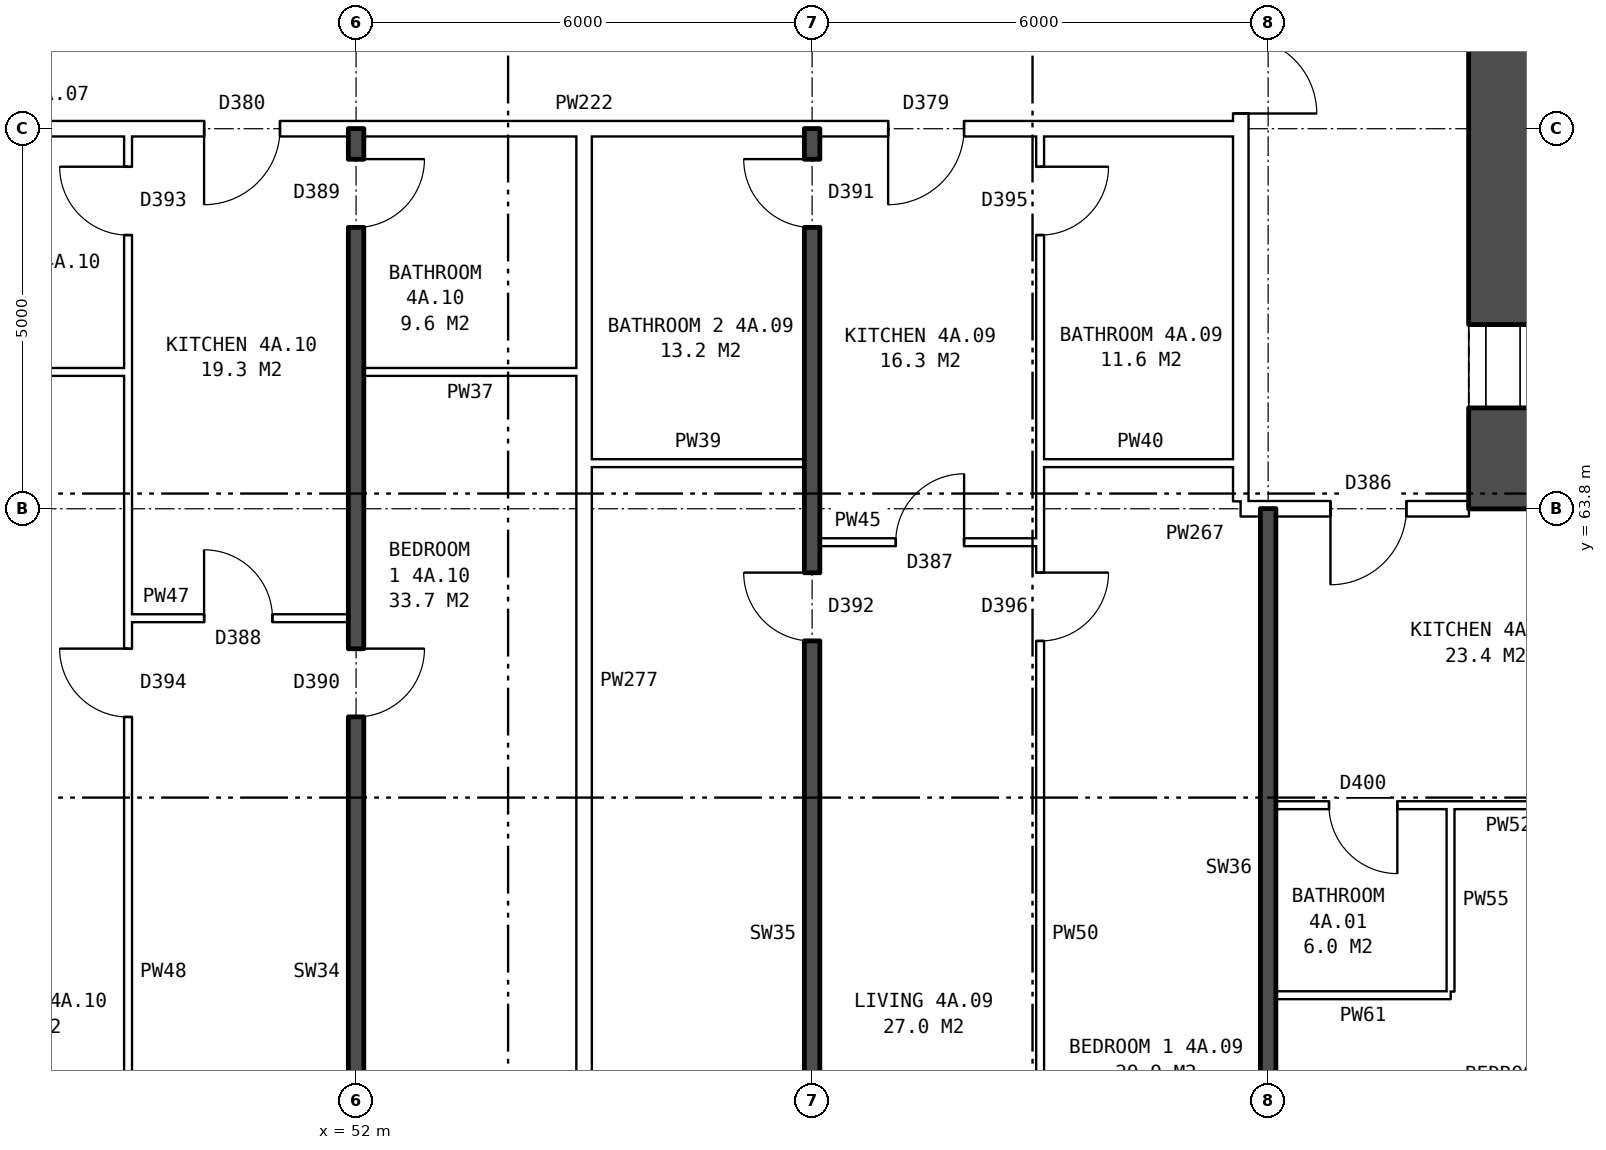
"""IFC4 building model, lengths in metres.
Left out: names, types, materials, properties, quantities, classifications, styles, units other than length and angle.
Written with IfcOpenShell. Run it as: python <this file> out.ifc"""

import sys

from ifc_helpers import new_model, si_unit, direction, frame, frame_2d, origin, place, context, subcontext, project, spatial, rectangle, extrude, element, fill, save


model = new_model("IFC4")
c1 = context("Model", 3, precision=1e-05, world=origin(), true_north=direction((0.0, 1.0)))
c2 = subcontext(c1, "Body", "Model", "MODEL_VIEW")
j1 = project(units=[si_unit("LENGTHUNIT", "METRE"), si_unit("PLANEANGLEUNIT", "RADIAN")], contexts=[c1])
p1 = place(None, origin())
s1 = spatial("IfcSite", under=j1, at=p1, CompositionType="ELEMENT")
p2 = place(p1, origin())
s2 = spatial("IfcBuilding", under=s1, at=p2, CompositionType="ELEMENT")
p3 = place(p2, frame((0.0, 0.0, 19.5)))
s3 = spatial("IfcBuildingStorey", under=s2, at=p3, CompositionType="ELEMENT", Elevation=19.5)
p4 = place(p3, frame((67.09, 64.7, 0.0), z_axis=(0.0, 0.0, 1.0), x_axis=(0.0, 1.0, 0.0)))
e1 = element("IfcWall", 1, at=p4, inside=s3, PredefinedType="SHEAR", context=c2, shape_type="SweptSolid", body=[
    extrude(rectangle(XDim=10.6, YDim=0.9, at=frame_2d((5.3, 0.0))), origin(), (0.0, 0.0, 1.0), 2.85),
])
p5 = place(p4, frame((0.425, 0.0, 0.0)))
e2 = element("IfcOpeningElement", 2, at=p5, cuts=e1, PredefinedType="OPENING", context=c2, shape_type="SweptSolid", body=[
    extrude(rectangle(XDim=1.1, YDim=2.1, at=frame_2d((0.55, 1.05))), frame((0.0, 0.46, 0.0), z_axis=(0.0, -1.0, 0.0), x_axis=(1.0, 0.0, 0.0)), (0.0, 0.0, 1.0), 0.92),
])
p6 = place(p4, frame((9.0, 0.0, 0.0)))
e3 = element("IfcOpeningElement", 3, at=p6, cuts=e1, PredefinedType="OPENING", context=c2, shape_type="SweptSolid", body=[
    extrude(rectangle(XDim=1.1, YDim=2.1, at=frame_2d((0.55, 1.05))), frame((0.0, 0.46, 0.0), z_axis=(0.0, -1.0, 0.0), x_axis=(1.0, 0.0, 0.0)), (0.0, 0.0, 1.0), 0.92),
])
p7 = place(p3, frame((66.64, 64.25, 0.0), z_axis=(0.0, 0.0, 1.0), x_axis=(1.0, 0.0, 0.0)))
e4 = element("IfcWall", 4, at=p7, inside=s3, PredefinedType="SHEAR", context=c2, shape_type="SweptSolid", body=[
    extrude(rectangle(XDim=9.0, YDim=0.9, at=frame_2d((4.5, 0.0))), origin(), (0.0, 0.0, 1.0), 2.85),
])
p8 = place(p3, frame((63.64, 63.9, 0.0), z_axis=(0.0, 0.0, 1.0), x_axis=(0.0, 1.0, 0.0)))
e5 = element("IfcWall", 5, at=p8, inside=s3, PredefinedType="PARTITIONING", context=c2, shape_type="SweptSolid", body=[
    extrude(rectangle(XDim=12.2, YDim=0.2, at=frame_2d((6.1, 0.0))), origin(), (0.0, 0.0, 1.0), 2.85),
])
p9 = place(p8, frame((5.1, 0.0, 0.0)))
e6 = element("IfcOpeningElement", 6, at=p9, cuts=e5, PredefinedType="OPENING", context=c2, shape_type="SweptSolid", body=[
    extrude(rectangle(XDim=2.0, YDim=2.1, at=frame_2d((1.0, 1.05))), frame((0.0, 0.11, 0.0), z_axis=(0.0, -1.0, 0.0), x_axis=(1.0, 0.0, 0.0)), (0.0, 0.0, 1.0), 0.22),
])
p10 = place(p3, frame((64.1, 57.4, 0.0), z_axis=(0.0, 0.0, 1.0), x_axis=(1.0, 0.0, 0.0)))
e7 = element("IfcWall", 7, at=p10, inside=s3, PredefinedType="PARTITIONING", context=c2, shape_type="SweptSolid", body=[
    extrude(rectangle(XDim=2.3, YDim=0.1, at=frame_2d((1.15, 0.0))), origin(), (0.0, 0.0, 1.0), 2.85),
])
p11 = place(p3, frame((64.1, 59.9, 0.0), z_axis=(0.0, 0.0, 1.0), x_axis=(1.0, 0.0, 0.0)))
e8 = element("IfcWall", 8, at=p11, inside=s3, PredefinedType="PARTITIONING", context=c2, shape_type="SweptSolid", body=[
    extrude(rectangle(XDim=5.8, YDim=0.1, at=frame_2d((2.9, 0.0))), origin(), (0.0, 0.0, 1.0), 2.85),
])
p12 = place(p11, frame((3.6, 0.0, 0.0)))
e9 = element("IfcOpeningElement", 9, at=p12, cuts=e8, PredefinedType="OPENING", context=c2, shape_type="SweptSolid", body=[
    extrude(rectangle(XDim=0.9, YDim=2.1, at=frame_2d((0.45, 1.05))), frame((0.0, 0.06, 0.0), z_axis=(0.0, -1.0, 0.0), x_axis=(1.0, 0.0, 0.0)), (0.0, 0.0, 1.0), 0.12),
])
p13 = place(p11, frame((0.7, 0.0, 0.0)))
e10 = element("IfcOpeningElement", 10, at=p13, cuts=e8, PredefinedType="OPENING", context=c2, shape_type="SweptSolid", body=[
    extrude(rectangle(XDim=0.9, YDim=2.1, at=frame_2d((0.45, 1.05))), frame((0.0, 0.06, 0.0), z_axis=(0.0, -1.0, 0.0), x_axis=(1.0, 0.0, 0.0)), (0.0, 0.0, 1.0), 0.12),
])
p14 = place(p3, frame((49.0, 62.36, 0.0), z_axis=(0.0, 0.0, 1.0), x_axis=(1.0, 0.0, 0.0)))
e11 = element("IfcWall", 11, at=p14, inside=s3, PredefinedType="PARTITIONING", context=c2, shape_type="SweptSolid", body=[
    extrude(rectangle(XDim=2.9, YDim=0.1, at=frame_2d((1.45, 0.0))), origin(), (0.0, 0.0, 1.0), 2.85),
])
p15 = place(p14, frame((1.0, 0.0, 0.0)))
e12 = element("IfcOpeningElement", 12, at=p15, cuts=e11, PredefinedType="OPENING", context=c2, shape_type="SweptSolid", body=[
    extrude(rectangle(XDim=0.9, YDim=2.1, at=frame_2d((0.45, 1.05))), frame((0.0, 0.06, 0.0), z_axis=(0.0, -1.0, 0.0), x_axis=(1.0, 0.0, 0.0)), (0.0, 0.0, 1.0), 0.12),
])
p16 = place(p3, frame((58.1, 63.36, 0.0), z_axis=(0.0, 0.0, 1.0), x_axis=(1.0, 0.0, 0.0)))
e13 = element("IfcWall", 13, at=p16, inside=s3, PredefinedType="PARTITIONING", context=c2, shape_type="SweptSolid", body=[
    extrude(rectangle(XDim=2.9, YDim=0.1, at=frame_2d((1.45, 0.0))), origin(), (0.0, 0.0, 1.0), 2.85),
])
p17 = place(p16, frame((1.0, 0.0, 0.0)))
e14 = element("IfcOpeningElement", 14, at=p17, cuts=e13, PredefinedType="OPENING", context=c2, shape_type="SweptSolid", body=[
    extrude(rectangle(XDim=0.9, YDim=2.1, at=frame_2d((0.45, 1.05))), frame((0.0, 0.06, 0.0), z_axis=(0.0, -1.0, 0.0), x_axis=(1.0, 0.0, 0.0)), (0.0, 0.0, 1.0), 0.12),
])
p18 = place(p3, frame((63.64, 63.8, 0.0), z_axis=(0.0, 0.0, 1.0), x_axis=(1.0, 0.0, 0.0)))
e15 = element("IfcWall", 15, at=p18, inside=s3, PredefinedType="PARTITIONING", context=c2, shape_type="SweptSolid", body=[
    extrude(rectangle(XDim=3.0, YDim=0.2, at=frame_2d((1.5, 0.0))), origin(), (0.0, 0.0, 1.0), 2.85),
])
p19 = place(p18, frame((1.18, 0.0, 0.0)))
e16 = element("IfcOpeningElement", 16, at=p19, cuts=e15, PredefinedType="OPENING", context=c2, shape_type="SweptSolid", body=[
    extrude(rectangle(XDim=1.0, YDim=2.1, at=frame_2d((0.5, 1.05))), frame((0.0, 0.11, 0.0), z_axis=(0.0, -1.0, 0.0), x_axis=(1.0, 0.0, 0.0)), (0.0, 0.0, 1.0), 0.22),
])
p20 = place(p3, frame((55.1, 64.4, 0.0), z_axis=(0.0, 0.0, 1.0), x_axis=(1.0, 0.0, 0.0)))
e17 = element("IfcWall", 17, at=p20, inside=s3, PredefinedType="PARTITIONING", context=c2, shape_type="SweptSolid", body=[
    extrude(rectangle(XDim=2.8, YDim=0.1, at=frame_2d((1.4, 0.0))), origin(), (0.0, 0.0, 1.0), 2.85),
])
p21 = place(p3, frame((61.0, 64.4, 0.0), z_axis=(0.0, 0.0, 1.0), x_axis=(1.0, 0.0, 0.0)))
e18 = element("IfcWall", 18, at=p21, inside=s3, PredefinedType="PARTITIONING", context=c2, shape_type="SweptSolid", body=[
    extrude(rectangle(XDim=2.64, YDim=0.1, at=frame_2d((1.32, 0.0))), origin(), (0.0, 0.0, 1.0), 2.85),
])
p22 = place(p3, frame((46.1, 65.6, 0.0), z_axis=(0.0, 0.0, 1.0), x_axis=(1.0, 0.0, 0.0)))
e19 = element("IfcWall", 19, at=p22, inside=s3, PredefinedType="PARTITIONING", context=c2, shape_type="SweptSolid", body=[
    extrude(rectangle(XDim=2.9, YDim=0.1, at=frame_2d((1.45, 0.0))), origin(), (0.0, 0.0, 1.0), 2.85),
])
p23 = place(p3, frame((52.1, 65.6, 0.0), z_axis=(0.0, 0.0, 1.0), x_axis=(1.0, 0.0, 0.0)))
e20 = element("IfcWall", 20, at=p23, inside=s3, PredefinedType="PARTITIONING", context=c2, shape_type="SweptSolid", body=[
    extrude(rectangle(XDim=2.8, YDim=0.1, at=frame_2d((1.4, 0.0))), origin(), (0.0, 0.0, 1.0), 2.85),
])
p24 = place(p3, frame((44.36, 68.8, 0.0), z_axis=(0.0, 0.0, 1.0), x_axis=(1.0, 0.0, 0.0)))
e21 = element("IfcWall", 21, at=p24, inside=s3, PredefinedType="PARTITIONING", context=c2, shape_type="SweptSolid", body=[
    extrude(rectangle(XDim=19.28, YDim=0.2, at=frame_2d((9.64, 0.0))), origin(), (0.0, 0.0, 1.0), 2.85),
])
p25 = place(p24, frame((14.64, 0.0, 0.0)))
e22 = element("IfcOpeningElement", 22, at=p25, cuts=e21, PredefinedType="OPENING", context=c2, shape_type="SweptSolid", body=[
    extrude(rectangle(XDim=1.0, YDim=2.1, at=frame_2d((0.5, 1.05))), frame((0.0, 0.11, 0.0), z_axis=(0.0, -1.0, 0.0), x_axis=(1.0, 0.0, 0.0)), (0.0, 0.0, 1.0), 0.22),
])
p26 = place(p24, frame((5.64, 0.0, 0.0)))
e23 = element("IfcOpeningElement", 23, at=p26, cuts=e21, PredefinedType="OPENING", context=c2, shape_type="SweptSolid", body=[
    extrude(rectangle(XDim=1.0, YDim=2.1, at=frame_2d((0.5, 1.05))), frame((0.0, 0.11, 0.0), z_axis=(0.0, -1.0, 0.0), x_axis=(1.0, 0.0, 0.0)), (0.0, 0.0, 1.0), 0.22),
])
p27 = place(p3, frame((49.0, 54.36, 0.0), z_axis=(0.0, 0.0, 1.0), x_axis=(0.0, 1.0, 0.0)))
e24 = element("IfcWall", 24, at=p27, inside=s3, PredefinedType="PARTITIONING", context=c2, shape_type="SweptSolid", body=[
    extrude(rectangle(XDim=14.34, YDim=0.1, at=frame_2d((7.17, 0.0))), origin(), (0.0, 0.0, 1.0), 2.85),
])
p28 = place(p27, frame((6.7, 0.0, 0.0)))
e25 = element("IfcOpeningElement", 25, at=p28, cuts=e24, PredefinedType="OPENING", context=c2, shape_type="SweptSolid", body=[
    extrude(rectangle(XDim=0.9, YDim=2.1, at=frame_2d((0.45, 1.05))), frame((0.0, 0.06, 0.0), z_axis=(0.0, -1.0, 0.0), x_axis=(1.0, 0.0, 0.0)), (0.0, 0.0, 1.0), 0.12),
])
p29 = place(p27, frame((13.04, 0.0, 0.0)))
e26 = element("IfcOpeningElement", 26, at=p29, cuts=e24, PredefinedType="OPENING", context=c2, shape_type="SweptSolid", body=[
    extrude(rectangle(XDim=0.9, YDim=2.1, at=frame_2d((0.45, 1.05))), frame((0.0, 0.06, 0.0), z_axis=(0.0, -1.0, 0.0), x_axis=(1.0, 0.0, 0.0)), (0.0, 0.0, 1.0), 0.12),
])
p30 = place(p3, frame((52.0, 54.36, 0.0), z_axis=(0.0, 0.0, 1.0), x_axis=(0.0, 1.0, 0.0)))
e27 = element("IfcWall", 27, at=p30, inside=s3, PredefinedType="SOLIDWALL", context=c2, shape_type="SweptSolid", body=[
    extrude(rectangle(XDim=14.44, YDim=0.2, at=frame_2d((7.22, 0.0))), origin(), (0.0, 0.0, 1.0), 2.85),
])
p31 = place(p30, frame((6.7, 0.0, 0.0)))
e28 = element("IfcOpeningElement", 28, at=p31, cuts=e27, PredefinedType="OPENING", context=c2, shape_type="SweptSolid", body=[
    extrude(rectangle(XDim=0.9, YDim=2.1, at=frame_2d((0.45, 1.05))), frame((0.0, 0.11, 0.0), z_axis=(0.0, -1.0, 0.0), x_axis=(1.0, 0.0, 0.0)), (0.0, 0.0, 1.0), 0.22),
])
p32 = place(p30, frame((13.14, 0.0, 0.0)))
e29 = element("IfcOpeningElement", 29, at=p32, cuts=e27, PredefinedType="OPENING", context=c2, shape_type="SweptSolid", body=[
    extrude(rectangle(XDim=0.9, YDim=2.1, at=frame_2d((0.45, 1.05))), frame((0.0, 0.11, 0.0), z_axis=(0.0, -1.0, 0.0), x_axis=(1.0, 0.0, 0.0)), (0.0, 0.0, 1.0), 0.22),
])
p33 = place(p3, frame((55.0, 54.36, 0.0), z_axis=(0.0, 0.0, 1.0), x_axis=(0.0, 1.0, 0.0)))
e30 = element("IfcWall", 30, at=p33, inside=s3, PredefinedType="PARTITIONING", context=c2, shape_type="SweptSolid", body=[
    extrude(rectangle(XDim=14.34, YDim=0.2, at=frame_2d((7.17, 0.0))), origin(), (0.0, 0.0, 1.0), 2.85),
])
p34 = place(p3, frame((58.0, 54.36, 0.0), z_axis=(0.0, 0.0, 1.0), x_axis=(0.0, 1.0, 0.0)))
e31 = element("IfcWall", 31, at=p34, inside=s3, PredefinedType="SOLIDWALL", context=c2, shape_type="SweptSolid", body=[
    extrude(rectangle(XDim=14.44, YDim=0.2, at=frame_2d((7.22, 0.0))), origin(), (0.0, 0.0, 1.0), 2.85),
])
p35 = place(p34, frame((7.7, 0.0, 0.0)))
e32 = element("IfcOpeningElement", 32, at=p35, cuts=e31, PredefinedType="OPENING", context=c2, shape_type="SweptSolid", body=[
    extrude(rectangle(XDim=0.9, YDim=2.1, at=frame_2d((0.45, 1.05))), frame((0.0, 0.11, 0.0), z_axis=(0.0, -1.0, 0.0), x_axis=(1.0, 0.0, 0.0)), (0.0, 0.0, 1.0), 0.22),
])
p36 = place(p34, frame((13.14, 0.0, 0.0)))
e33 = element("IfcOpeningElement", 33, at=p36, cuts=e31, PredefinedType="OPENING", context=c2, shape_type="SweptSolid", body=[
    extrude(rectangle(XDim=0.9, YDim=2.1, at=frame_2d((0.45, 1.05))), frame((0.0, 0.11, 0.0), z_axis=(0.0, -1.0, 0.0), x_axis=(1.0, 0.0, 0.0)), (0.0, 0.0, 1.0), 0.22),
])
p37 = place(p3, frame((61.0, 54.36, 0.0), z_axis=(0.0, 0.0, 1.0), x_axis=(0.0, 1.0, 0.0)))
e34 = element("IfcWall", 34, at=p37, inside=s3, PredefinedType="PARTITIONING", context=c2, shape_type="SweptSolid", body=[
    extrude(rectangle(XDim=14.34, YDim=0.1, at=frame_2d((7.17, 0.0))), origin(), (0.0, 0.0, 1.0), 2.85),
])
p38 = place(p37, frame((7.7, 0.0, 0.0)))
e35 = element("IfcOpeningElement", 35, at=p38, cuts=e34, PredefinedType="OPENING", context=c2, shape_type="SweptSolid", body=[
    extrude(rectangle(XDim=0.9, YDim=2.1, at=frame_2d((0.45, 1.05))), frame((0.0, 0.06, 0.0), z_axis=(0.0, -1.0, 0.0), x_axis=(1.0, 0.0, 0.0)), (0.0, 0.0, 1.0), 0.12),
])
p39 = place(p37, frame((13.04, 0.0, 0.0)))
e36 = element("IfcOpeningElement", 36, at=p39, cuts=e34, PredefinedType="OPENING", context=c2, shape_type="SweptSolid", body=[
    extrude(rectangle(XDim=0.9, YDim=2.1, at=frame_2d((0.45, 1.05))), frame((0.0, 0.06, 0.0), z_axis=(0.0, -1.0, 0.0), x_axis=(1.0, 0.0, 0.0)), (0.0, 0.0, 1.0), 0.12),
])
p40 = place(p3, frame((64.0, 54.36, 0.0), z_axis=(0.0, 0.0, 1.0), x_axis=(0.0, 1.0, 0.0)))
e37 = element("IfcWall", 37, at=p40, inside=s3, PredefinedType="SOLIDWALL", context=c2, shape_type="SweptSolid", body=[
    extrude(rectangle(XDim=9.44, YDim=0.2, at=frame_2d((4.72, 0.0))), origin(), (0.0, 0.0, 1.0), 2.85),
])
p41 = place(p3, frame((66.4, 57.45, 0.0), z_axis=(0.0, 0.0, 1.0), x_axis=(0.0, 1.0, 0.0)))
e38 = element("IfcWall", 38, at=p41, inside=s3, PredefinedType="PARTITIONING", context=c2, shape_type="SweptSolid", body=[
    extrude(rectangle(XDim=2.4, YDim=0.1, at=frame_2d((1.2, 0.0))), origin(), (0.0, 0.0, 1.0), 2.85),
])
p42 = place(p9, frame((2.0, 0.0, 0.0), z_axis=(0.0, 0.0, 1.0), x_axis=(-1.0, 0.0, 0.0)))
e39 = element("IfcDoor", 39, at=p42, inside=s3, OperationType="DOUBLE_DOOR_SINGLE_SWING", PredefinedType="DOOR", context=c2, shape_type="SweptSolid", body=[
    extrude(rectangle(XDim=2.0, YDim=2.1, at=frame_2d((1.0, 1.05))), frame((0.0, 0.025, 0.0), z_axis=(0.0, -1.0, 0.0), x_axis=(1.0, 0.0, 0.0)), (0.0, 0.0, 1.0), 0.05),
])
fill(e6, e39)
p43 = place(p19, frame((1.0, 0.0, 0.0), z_axis=(0.0, 0.0, 1.0), x_axis=(-1.0, 0.0, 0.0)))
e40 = element("IfcDoor", 40, at=p43, inside=s3, OperationType="SINGLE_SWING_RIGHT", PredefinedType="DOOR", context=c2, shape_type="SweptSolid", body=[
    extrude(rectangle(XDim=1.0, YDim=2.1, at=frame_2d((0.5, 1.05))), frame((0.0, 0.025, 0.0), z_axis=(0.0, -1.0, 0.0), x_axis=(1.0, 0.0, 0.0)), (0.0, 0.0, 1.0), 0.05),
])
fill(e16, e40)
p44 = place(p13, frame((0.9, 0.0, 0.0), z_axis=(0.0, 0.0, 1.0), x_axis=(-1.0, 0.0, 0.0)))
e41 = element("IfcDoor", 41, at=p44, inside=s3, OperationType="SINGLE_SWING_LEFT", PredefinedType="DOOR", context=c2, shape_type="SweptSolid", body=[
    extrude(rectangle(XDim=0.9, YDim=2.1, at=frame_2d((0.45, 1.05))), frame((0.0, 0.025, 0.0), z_axis=(0.0, -1.0, 0.0), x_axis=(1.0, 0.0, 0.0)), (0.0, 0.0, 1.0), 0.05),
])
fill(e10, e41)
p45 = place(p38, frame((0.9, 0.0, 0.0), z_axis=(0.0, 0.0, 1.0), x_axis=(-1.0, 0.0, 0.0)))
e42 = element("IfcDoor", 42, at=p45, inside=s3, OperationType="SINGLE_SWING_LEFT", PredefinedType="DOOR", context=c2, shape_type="SweptSolid", body=[
    extrude(rectangle(XDim=0.9, YDim=2.1, at=frame_2d((0.45, 1.05))), frame((0.0, 0.025, 0.0), z_axis=(0.0, -1.0, 0.0), x_axis=(1.0, 0.0, 0.0)), (0.0, 0.0, 1.0), 0.05),
])
fill(e35, e42)
p46 = place(p35, origin())
e43 = element("IfcDoor", 43, at=p46, inside=s3, OperationType="SINGLE_SWING_RIGHT", PredefinedType="DOOR", context=c2, shape_type="SweptSolid", body=[
    extrude(rectangle(XDim=0.9, YDim=2.1, at=frame_2d((0.45, 1.05))), frame((0.0, 0.025, 0.0), z_axis=(0.0, -1.0, 0.0), x_axis=(1.0, 0.0, 0.0)), (0.0, 0.0, 1.0), 0.05),
])
fill(e32, e43)
p47 = place(p25, frame((1.0, 0.0, 0.0), z_axis=(0.0, 0.0, 1.0), x_axis=(-1.0, 0.0, 0.0)))
e44 = element("IfcDoor", 44, at=p47, inside=s3, OperationType="SINGLE_SWING_RIGHT", PredefinedType="DOOR", context=c2, shape_type="SweptSolid", body=[
    extrude(rectangle(XDim=1.0, YDim=2.1, at=frame_2d((0.5, 1.05))), frame((0.0, 0.025, 0.0), z_axis=(0.0, -1.0, 0.0), x_axis=(1.0, 0.0, 0.0)), (0.0, 0.0, 1.0), 0.05),
])
fill(e22, e44)
p48 = place(p17, origin())
e45 = element("IfcDoor", 45, at=p48, inside=s3, OperationType="SINGLE_SWING_RIGHT", PredefinedType="DOOR", context=c2, shape_type="SweptSolid", body=[
    extrude(rectangle(XDim=0.9, YDim=2.1, at=frame_2d((0.45, 1.05))), frame((0.0, 0.025, 0.0), z_axis=(0.0, -1.0, 0.0), x_axis=(1.0, 0.0, 0.0)), (0.0, 0.0, 1.0), 0.05),
])
fill(e14, e45)
p49 = place(p39, frame((0.9, 0.0, 0.0), z_axis=(0.0, 0.0, 1.0), x_axis=(-1.0, 0.0, 0.0)))
e46 = element("IfcDoor", 46, at=p49, inside=s3, OperationType="SINGLE_SWING_LEFT", PredefinedType="DOOR", context=c2, shape_type="SweptSolid", body=[
    extrude(rectangle(XDim=0.9, YDim=2.1, at=frame_2d((0.45, 1.05))), frame((0.0, 0.025, 0.0), z_axis=(0.0, -1.0, 0.0), x_axis=(1.0, 0.0, 0.0)), (0.0, 0.0, 1.0), 0.05),
])
fill(e36, e46)
p50 = place(p36, origin())
e47 = element("IfcDoor", 47, at=p50, inside=s3, OperationType="SINGLE_SWING_RIGHT", PredefinedType="DOOR", context=c2, shape_type="SweptSolid", body=[
    extrude(rectangle(XDim=0.9, YDim=2.1, at=frame_2d((0.45, 1.05))), frame((0.0, 0.025, 0.0), z_axis=(0.0, -1.0, 0.0), x_axis=(1.0, 0.0, 0.0)), (0.0, 0.0, 1.0), 0.05),
])
fill(e33, e47)
p51 = place(p31, frame((0.9, 0.0, 0.0), z_axis=(0.0, 0.0, 1.0), x_axis=(-1.0, 0.0, 0.0)))
e48 = element("IfcDoor", 48, at=p51, inside=s3, OperationType="SINGLE_SWING_LEFT", PredefinedType="DOOR", context=c2, shape_type="SweptSolid", body=[
    extrude(rectangle(XDim=0.9, YDim=2.1, at=frame_2d((0.45, 1.05))), frame((0.0, 0.025, 0.0), z_axis=(0.0, -1.0, 0.0), x_axis=(1.0, 0.0, 0.0)), (0.0, 0.0, 1.0), 0.05),
])
fill(e28, e48)
p52 = place(p28, origin())
e49 = element("IfcDoor", 49, at=p52, inside=s3, OperationType="SINGLE_SWING_RIGHT", PredefinedType="DOOR", context=c2, shape_type="SweptSolid", body=[
    extrude(rectangle(XDim=0.9, YDim=2.1, at=frame_2d((0.45, 1.05))), frame((0.0, 0.025, 0.0), z_axis=(0.0, -1.0, 0.0), x_axis=(1.0, 0.0, 0.0)), (0.0, 0.0, 1.0), 0.05),
])
fill(e25, e49)
p53 = place(p26, frame((1.0, 0.0, 0.0), z_axis=(0.0, 0.0, 1.0), x_axis=(-1.0, 0.0, 0.0)))
e50 = element("IfcDoor", 50, at=p53, inside=s3, OperationType="SINGLE_SWING_RIGHT", PredefinedType="DOOR", context=c2, shape_type="SweptSolid", body=[
    extrude(rectangle(XDim=1.0, YDim=2.1, at=frame_2d((0.5, 1.05))), frame((0.0, 0.025, 0.0), z_axis=(0.0, -1.0, 0.0), x_axis=(1.0, 0.0, 0.0)), (0.0, 0.0, 1.0), 0.05),
])
fill(e23, e50)
p54 = place(p15, origin())
e51 = element("IfcDoor", 51, at=p54, inside=s3, OperationType="SINGLE_SWING_LEFT", PredefinedType="DOOR", context=c2, shape_type="SweptSolid", body=[
    extrude(rectangle(XDim=0.9, YDim=2.1, at=frame_2d((0.45, 1.05))), frame((0.0, 0.025, 0.0), z_axis=(0.0, -1.0, 0.0), x_axis=(1.0, 0.0, 0.0)), (0.0, 0.0, 1.0), 0.05),
])
fill(e12, e51)
p55 = place(p32, frame((0.9, 0.0, 0.0), z_axis=(0.0, 0.0, 1.0), x_axis=(-1.0, 0.0, 0.0)))
e52 = element("IfcDoor", 52, at=p55, inside=s3, OperationType="SINGLE_SWING_LEFT", PredefinedType="DOOR", context=c2, shape_type="SweptSolid", body=[
    extrude(rectangle(XDim=0.9, YDim=2.1, at=frame_2d((0.45, 1.05))), frame((0.0, 0.025, 0.0), z_axis=(0.0, -1.0, 0.0), x_axis=(1.0, 0.0, 0.0)), (0.0, 0.0, 1.0), 0.05),
])
fill(e29, e52)
p56 = place(p29, origin())
e53 = element("IfcDoor", 53, at=p56, inside=s3, OperationType="SINGLE_SWING_RIGHT", PredefinedType="DOOR", context=c2, shape_type="SweptSolid", body=[
    extrude(rectangle(XDim=0.9, YDim=2.1, at=frame_2d((0.45, 1.05))), frame((0.0, 0.025, 0.0), z_axis=(0.0, -1.0, 0.0), x_axis=(1.0, 0.0, 0.0)), (0.0, 0.0, 1.0), 0.05),
])
fill(e26, e53)
save(model, sys.argv[1])
